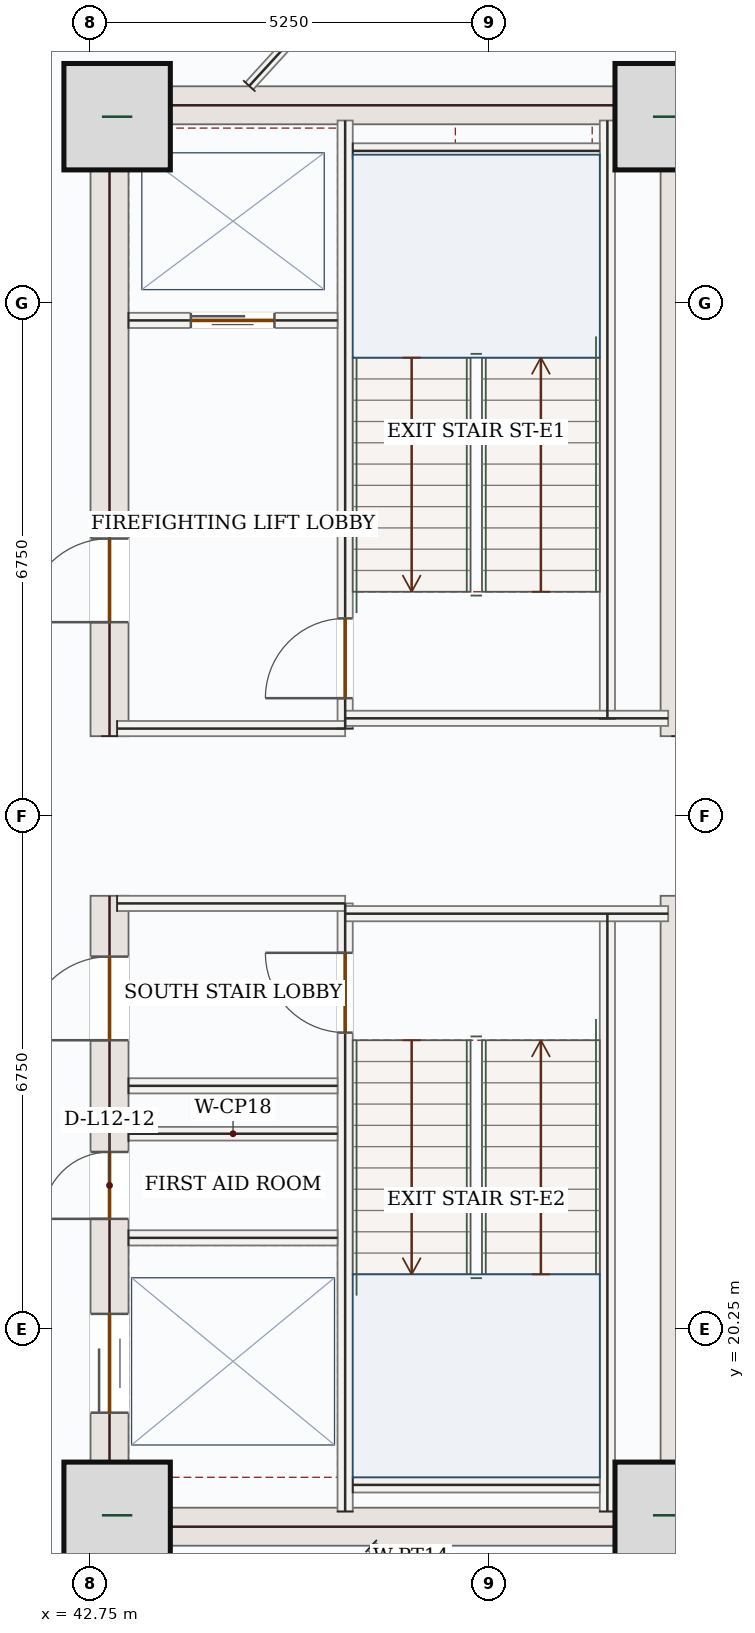
"""IFC4 building model, lengths in metres.
Left out: names, types, materials, properties, quantities, classifications, styles, units other than length and angle.
Written with IfcOpenShell. Run it as: python <this file> out.ifc"""

import sys

from ifc_helpers import new_model, si_unit, direction, frame, frame_2d, origin, origin_2d, place, context, subcontext, project, spatial, rectangle, extrude, source, transform, mapped, element, fill, save


model = new_model("IFC4")
c1 = context("Model", 3, precision=1e-05, world=origin(), true_north=direction((0.0, 1.0)))
c2 = subcontext(c1, "Body", "Model", "MODEL_VIEW")
j1 = project(units=[si_unit("LENGTHUNIT", "METRE"), si_unit("PLANEANGLEUNIT", "RADIAN")], contexts=[c1])
p1 = place(None, origin())
s1 = spatial("IfcSite", under=j1, at=p1, CompositionType="ELEMENT")
p2 = place(p1, origin())
s2 = spatial("IfcBuilding", under=s1, at=p2, CompositionType="ELEMENT")
p3 = place(p2, frame((0.0, 0.0, 58.5)))
s3 = spatial("IfcBuildingStorey", under=s2, at=p3, CompositionType="ELEMENT", Elevation=58.5)
p4 = place(p3, frame((43.0, 17.4, 0.0), z_axis=(0.0, 0.0, 1.0), x_axis=(0.0, 1.0, 0.0)))
e1 = element("IfcWall", 1, at=p4, inside=s3, PredefinedType="SHEAR", context=c2, shape_type="SweptSolid", body=[
    extrude(rectangle(XDim=8.55, YDim=0.5, at=frame_2d((4.275, 0.0))), origin(), (0.0, 0.0, 1.0), 3.95),
])
p5 = place(p4, frame((6.65, 0.0, 0.0)))
e2 = element("IfcOpeningElement", 2, at=p5, cuts=e1, PredefinedType="OPENING", context=c2, shape_type="SweptSolid", body=[
    extrude(rectangle(XDim=1.1, YDim=2.2, at=frame_2d((0.55, 1.1))), frame((0.0, 0.26, 0.0), z_axis=(0.0, -1.0, 0.0), x_axis=(1.0, 0.0, 0.0)), (0.0, 0.0, 1.0), 0.52),
])
p6 = place(p4, frame((1.75, 0.0, 0.0)))
e3 = element("IfcOpeningElement", 3, at=p6, cuts=e1, PredefinedType="OPENING", context=c2, shape_type="SweptSolid", body=[
    extrude(rectangle(XDim=1.3, YDim=2.2, at=frame_2d((0.65, 1.1))), frame((0.0, 0.26, 0.0), z_axis=(0.0, -1.0, 0.0), x_axis=(1.0, 0.0, 0.0)), (0.0, 0.0, 1.0), 0.52),
])
p7 = place(p4, frame((4.3, 0.0, 0.0)))
e4 = element("IfcOpeningElement", 4, at=p7, cuts=e1, PredefinedType="OPENING", context=c2, shape_type="SweptSolid", body=[
    extrude(rectangle(XDim=0.88, YDim=2.1, at=frame_2d((0.44, 1.05))), frame((0.0, 0.26, 0.0), z_axis=(0.0, -1.0, 0.0), x_axis=(1.0, 0.0, 0.0)), (0.0, 0.0, 1.0), 0.52),
])
p8 = place(p3, frame((43.0, 28.05, 0.0), z_axis=(0.0, 0.0, 1.0), x_axis=(0.0, 1.0, 0.0)))
e5 = element("IfcWall", 5, at=p8, inside=s3, PredefinedType="SHEAR", context=c2, shape_type="SweptSolid", body=[
    extrude(rectangle(XDim=8.55, YDim=0.5, at=frame_2d((4.275, 0.0))), origin(), (0.0, 0.0, 1.0), 3.95),
])
p9 = place(p8, frame((1.5, 0.0, 0.0)))
e6 = element("IfcOpeningElement", 6, at=p9, cuts=e5, PredefinedType="OPENING", context=c2, shape_type="SweptSolid", body=[
    extrude(rectangle(XDim=1.1, YDim=2.2, at=frame_2d((0.55, 1.1))), frame((0.0, 0.26, 0.0), z_axis=(0.0, -1.0, 0.0), x_axis=(1.0, 0.0, 0.0)), (0.0, 0.0, 1.0), 0.52),
])
m1 = source(origin(), c2, "Body", "SweptSolid", [
    extrude(rectangle(XDim=8.55, YDim=0.5, at=frame_2d((4.275, 0.0))), origin(), (0.0, 0.0, 1.0), 3.95),
])
for number, where, z_axis, x_axis in (
    (7, (50.5, 17.4, 0.0), (0.0, 0.0, 1.0), (0.0, 1.0, 0.0)),
    (8, (50.5, 28.05, 0.0), (0.0, 0.0, 1.0), (0.0, 1.0, 0.0)),
):
    element("IfcWall", number, at=place(p3, frame(where, z_axis=z_axis, x_axis=x_axis)), inside=s3, PredefinedType="SHEAR", context=c2, shape_type="MappedRepresentation", body=[
        mapped(m1, transform((0.0, 0.0, 0.0), x_axis=(1.0, 0.0, 0.0), y_axis=(0.0, 1.0, 0.0), z_axis=(0.0, 0.0, 1.0), scale=1.0)),
    ])
m2 = source(origin(), c2, "Body", "SweptSolid", [
    extrude(rectangle(XDim=7.0, YDim=0.5, at=frame_2d((3.5, 0.0))), origin(), (0.0, 0.0, 1.0), 3.95),
])
for number, where, z_axis, x_axis in (
    (9, (43.25, 17.65, 0.0), (0.0, 0.0, 1.0), (1.0, 0.0, 0.0)),
    (10, (43.25, 36.35, 0.0), (0.0, 0.0, 1.0), (1.0, 0.0, 0.0)),
):
    element("IfcWall", number, at=place(p3, frame(where, z_axis=z_axis, x_axis=x_axis)), inside=s3, PredefinedType="SHEAR", context=c2, shape_type="MappedRepresentation", body=[
        mapped(m2, transform((0.0, 0.0, 0.0), x_axis=(1.0, 0.0, 0.0), y_axis=(0.0, 1.0, 0.0), z_axis=(0.0, 0.0, 1.0), scale=1.0)),
    ])
m3 = source(origin(), c2, "Body", "SweptSolid", [
    extrude(rectangle(XDim=1.4, YDim=1.4, at=origin_2d()), origin(), (0.0, 0.0, 1.0), 4.2),
])
for number, where, z_axis, x_axis in (
    (11, (43.1, 17.8, 0.0), (0.0, 0.0, 1.0), (1.0, 0.0, 0.0)),
    (12, (50.35, 17.8, 0.0), (0.0, 0.0, 1.0), (1.0, 0.0, 0.0)),
    (13, (43.1, 36.2, 0.0), (0.0, 0.0, 1.0), (1.0, 0.0, 0.0)),
    (14, (50.35, 36.2, 0.0), (0.0, 0.0, 1.0), (1.0, 0.0, 0.0)),
):
    element("IfcColumn", number, at=place(p3, frame(where, z_axis=z_axis, x_axis=x_axis)), inside=s3, PredefinedType="COLUMN", context=c2, shape_type="MappedRepresentation", body=[
        mapped(m3, transform((0.0, 0.0, 0.0), x_axis=(1.0, 0.0, 0.0), y_axis=(0.0, 1.0, 0.0), z_axis=(0.0, 0.0, 1.0), scale=1.0)),
    ])
p10 = place(p3, frame((53.06, 18.458, 0.0), z_axis=(0.0, 0.0, 1.0), x_axis=(-0.707106781187, -0.707106781187, 0.0)))
e15 = element("IfcWall", 15, at=p10, inside=s3, PredefinedType="SOLIDWALL", context=c2, shape_type="SweptSolid", body=[
    extrude(rectangle(XDim=5.258, YDim=0.32, at=frame_2d((2.629, 0.0))), origin(), (0.0, 0.0, 1.0), 3.95),
])
p11 = place(p10, frame((1.429, 0.0, 0.85)))
e16 = element("IfcOpeningElement", 16, at=p11, cuts=e15, PredefinedType="OPENING", context=c2, shape_type="SweptSolid", body=[
    extrude(rectangle(XDim=2.4, YDim=1.8, at=frame_2d((1.2, 0.9))), frame((0.0, 0.17, 0.0), z_axis=(0.0, -1.0, 0.0), x_axis=(1.0, 0.0, 0.0)), (0.0, 0.0, 1.0), 0.34),
])
m4 = source(origin(), c2, "Body", "SweptSolid", [
    extrude(rectangle(XDim=5.258, YDim=0.32, at=frame_2d((2.629, 0.0))), origin(), (0.0, 0.0, 1.0), 3.95),
])
p12 = place(p3, frame((49.342, 39.26, 0.0), z_axis=(0.0, 0.0, 1.0), x_axis=(0.707106781187, -0.707106781187, 0.0)))
e17 = element("IfcWall", 17, at=p12, inside=s3, PredefinedType="SOLIDWALL", context=c2, shape_type="MappedRepresentation", body=[
    mapped(m4, transform((0.0, 0.0, 0.0), x_axis=(1.0, 0.0, 0.0), y_axis=(0.0, 1.0, 0.0), z_axis=(0.0, 0.0, 1.0), scale=1.0)),
])
m5 = source(origin(), c2, "Body", "SweptSolid", [
    extrude(rectangle(XDim=7.87, YDim=0.2, at=frame_2d((3.935, 0.0))), origin(), (0.0, 0.0, 1.0), 3.95),
])
for number, where, z_axis, x_axis in (
    (18, (49.55, 17.85, 0.0), (0.0, 0.0, 1.0), (0.0, 1.0, 0.0)),
    (19, (49.55, 28.28, 0.0), (0.0, 0.0, 1.0), (0.0, 1.0, 0.0)),
):
    element("IfcWall", number, at=place(p3, frame(where, z_axis=z_axis, x_axis=x_axis)), inside=s3, PredefinedType="SOLIDWALL", context=c2, shape_type="MappedRepresentation", body=[
        mapped(m5, transform((0.0, 0.0, 0.0), x_axis=(1.0, 0.0, 0.0), y_axis=(0.0, 1.0, 0.0), z_axis=(0.0, 0.0, 1.0), scale=1.0)),
    ])
p13 = place(p3, frame((46.1, 17.85, 0.0), z_axis=(0.0, 0.0, 1.0), x_axis=(0.0, 1.0, 0.0)))
e20 = element("IfcWall", 20, at=p13, inside=s3, PredefinedType="SOLIDWALL", context=c2, shape_type="SweptSolid", body=[
    extrude(rectangle(XDim=8.0, YDim=0.2, at=frame_2d((4.0, 0.0))), origin(), (0.0, 0.0, 1.0), 3.95),
])
p14 = place(p13, frame((6.3, 0.0, 0.0)))
e21 = element("IfcOpeningElement", 21, at=p14, cuts=e20, PredefinedType="OPENING", context=c2, shape_type="SweptSolid", body=[
    extrude(rectangle(XDim=1.05, YDim=2.15, at=frame_2d((0.525, 1.075))), frame((0.0, 0.11, 0.0), z_axis=(0.0, -1.0, 0.0), x_axis=(1.0, 0.0, 0.0)), (0.0, 0.0, 1.0), 0.22),
])
p15 = place(p3, frame((46.1, 28.15, 0.0), z_axis=(0.0, 0.0, 1.0), x_axis=(0.0, 1.0, 0.0)))
e22 = element("IfcWall", 22, at=p15, inside=s3, PredefinedType="SOLIDWALL", context=c2, shape_type="SweptSolid", body=[
    extrude(rectangle(XDim=8.0, YDim=0.2, at=frame_2d((4.0, 0.0))), origin(), (0.0, 0.0, 1.0), 3.95),
])
p16 = place(p15, frame((0.4, 0.0, 0.0)))
e23 = element("IfcOpeningElement", 23, at=p16, cuts=e22, PredefinedType="OPENING", context=c2, shape_type="SweptSolid", body=[
    extrude(rectangle(XDim=1.05, YDim=2.15, at=frame_2d((0.525, 1.075))), frame((0.0, 0.11, 0.0), z_axis=(0.0, -1.0, 0.0), x_axis=(1.0, 0.0, 0.0)), (0.0, 0.0, 1.0), 0.22),
])
m6 = source(origin(), c2, "Body", "SweptSolid", [
    extrude(rectangle(XDim=3.0, YDim=0.2, at=frame_2d((1.5, 0.0))), origin(), (0.0, 0.0, 1.0), 3.95),
])
p17 = place(p3, frame((43.1, 25.85, 0.0), z_axis=(0.0, 0.0, 1.0), x_axis=(1.0, 0.0, 0.0)))
e24 = element("IfcWall", 24, at=p17, inside=s3, PredefinedType="SOLIDWALL", context=c2, shape_type="MappedRepresentation", body=[
    mapped(m6, transform((0.0, 0.0, 0.0), x_axis=(1.0, 0.0, 0.0), y_axis=(0.0, 1.0, 0.0), z_axis=(0.0, 0.0, 1.0), scale=1.0)),
])
m7 = source(origin(), c2, "Body", "SweptSolid", [
    extrude(rectangle(XDim=4.25, YDim=0.2, at=frame_2d((2.125, 0.0))), origin(), (0.0, 0.0, 1.0), 3.95),
])
p18 = place(p3, frame((46.1, 25.715, 0.0), z_axis=(0.0, 0.0, 1.0), x_axis=(1.0, 0.0, 0.0)))
e25 = element("IfcWall", 25, at=p18, inside=s3, PredefinedType="SOLIDWALL", context=c2, shape_type="MappedRepresentation", body=[
    mapped(m7, transform((0.0, 0.0, 0.0), x_axis=(1.0, 0.0, 0.0), y_axis=(0.0, 1.0, 0.0), z_axis=(0.0, 0.0, 1.0), scale=1.0)),
])
p19 = place(p3, frame((43.1, 28.15, 0.0), z_axis=(0.0, 0.0, 1.0), x_axis=(1.0, 0.0, 0.0)))
e26 = element("IfcWall", 26, at=p19, inside=s3, PredefinedType="SOLIDWALL", context=c2, shape_type="MappedRepresentation", body=[
    mapped(m6, transform((0.0, 0.0, 0.0), x_axis=(1.0, 0.0, 0.0), y_axis=(0.0, 1.0, 0.0), z_axis=(0.0, 0.0, 1.0), scale=1.0)),
])
p20 = place(p3, frame((46.1, 28.285, 0.0), z_axis=(0.0, 0.0, 1.0), x_axis=(1.0, 0.0, 0.0)))
e27 = element("IfcWall", 27, at=p20, inside=s3, PredefinedType="SOLIDWALL", context=c2, shape_type="MappedRepresentation", body=[
    mapped(m7, transform((0.0, 0.0, 0.0), x_axis=(1.0, 0.0, 0.0), y_axis=(0.0, 1.0, 0.0), z_axis=(0.0, 0.0, 1.0), scale=1.0)),
])
m8 = source(origin(), c2, "Body", "SweptSolid", [
    extrude(rectangle(XDim=3.25, YDim=0.2, at=frame_2d((1.625, 0.0))), origin(), (0.0, 0.0, 1.0), 3.95),
])
for number, where, z_axis, x_axis in (
    (28, (46.2, 35.75, 0.0), (0.0, 0.0, 1.0), (1.0, 0.0, 0.0)),
    (29, (46.2, 18.2, 0.0), (0.0, 0.0, 1.0), (1.0, 0.0, 0.0)),
):
    element("IfcWall", number, at=place(p3, frame(where, z_axis=z_axis, x_axis=x_axis)), inside=s3, PredefinedType="SOLIDWALL", context=c2, shape_type="MappedRepresentation", body=[
        mapped(m8, transform((0.0, 0.0, 0.0), x_axis=(1.0, 0.0, 0.0), y_axis=(0.0, 1.0, 0.0), z_axis=(0.0, 0.0, 1.0), scale=1.0)),
    ])
p21 = place(p3, frame((43.25, 33.52, 0.0), z_axis=(0.0, 0.0, 1.0), x_axis=(1.0, 0.0, 0.0)))
e30 = element("IfcWall", 30, at=p21, inside=s3, PredefinedType="SOLIDWALL", context=c2, shape_type="SweptSolid", body=[
    extrude(rectangle(XDim=2.75, YDim=0.2, at=frame_2d((1.375, 0.0))), origin(), (0.0, 0.0, 1.0), 3.95),
])
p22 = place(p21, frame((0.82, 0.0, 0.0)))
e31 = element("IfcOpeningElement", 31, at=p22, cuts=e30, PredefinedType="OPENING", context=c2, shape_type="SweptSolid", body=[
    extrude(rectangle(XDim=1.1, YDim=2.15, at=frame_2d((0.55, 1.075))), frame((0.0, 0.11, 0.0), z_axis=(0.0, -1.0, 0.0), x_axis=(1.0, 0.0, 0.0)), (0.0, 0.0, 1.0), 0.22),
])
m9 = source(origin(), c2, "Body", "SweptSolid", [
    extrude(rectangle(XDim=2.75, YDim=0.2, at=frame_2d((1.375, 0.0))), origin(), (0.0, 0.0, 1.0), 3.95),
])
for number, where, z_axis, x_axis in (
    (32, (43.25, 23.45, 0.0), (0.0, 0.0, 1.0), (1.0, 0.0, 0.0)),
    (33, (43.25, 21.45, 0.0), (0.0, 0.0, 1.0), (1.0, 0.0, 0.0)),
):
    element("IfcWall", number, at=place(p3, frame(where, z_axis=z_axis, x_axis=x_axis)), inside=s3, PredefinedType="SOLIDWALL", context=c2, shape_type="MappedRepresentation", body=[
        mapped(m9, transform((0.0, 0.0, 0.0), x_axis=(1.0, 0.0, 0.0), y_axis=(0.0, 1.0, 0.0), z_axis=(0.0, 0.0, 1.0), scale=1.0)),
    ])
m10 = source(origin(), c2, "Body", "SweptSolid", [
    extrude(rectangle(XDim=2.75, YDim=0.18, at=frame_2d((1.375, 0.0))), origin(), (0.0, 0.0, 1.0), 3.95),
])
p23 = place(p3, frame((43.25, 22.82, 0.0), z_axis=(0.0, 0.0, 1.0), x_axis=(1.0, 0.0, 0.0)))
e34 = element("IfcWall", 34, at=p23, inside=s3, PredefinedType="PARTITIONING", context=c2, shape_type="MappedRepresentation", body=[
    mapped(m10, transform((0.0, 0.0, 0.0), x_axis=(1.0, 0.0, 0.0), y_axis=(0.0, 1.0, 0.0), z_axis=(0.0, 0.0, 1.0), scale=1.0)),
])
m11 = source(origin(), c2, "Body", "SweptSolid", [
    extrude(rectangle(XDim=1.417, YDim=0.14, at=frame_2d((0.708, 0.0))), origin(), (0.0, 0.0, 1.0), 3.95),
])
p24 = place(p3, frame((46.443, 17.395, 0.0), z_axis=(0.0, 0.0, 1.0), x_axis=(0.737776192982, -0.675045397784, 0.0)))
e35 = element("IfcWall", 35, at=p24, inside=s3, PredefinedType="PARTITIONING", context=c2, shape_type="MappedRepresentation", body=[
    mapped(m11, transform((0.0, 0.0, 0.0), x_axis=(1.0, 0.0, 0.0), y_axis=(0.0, 1.0, 0.0), z_axis=(0.0, 0.0, 1.0), scale=1.0)),
])
m12 = source(origin(), c2, "Body", "SweptSolid", [
    extrude(rectangle(XDim=3.375, YDim=0.14, at=frame_2d((1.688, 0.0))), origin(), (0.0, 0.0, 1.0), 3.95),
])
p25 = place(p3, frame((44.838, 36.605, 0.0), z_axis=(0.0, 0.0, 1.0), x_axis=(0.674974079893, 0.737841440604, 0.0)))
e36 = element("IfcWall", 36, at=p25, inside=s3, PredefinedType="PARTITIONING", context=c2, shape_type="MappedRepresentation", body=[
    mapped(m12, transform((0.0, 0.0, 0.0), x_axis=(1.0, 0.0, 0.0), y_axis=(0.0, 1.0, 0.0), z_axis=(0.0, 0.0, 1.0), scale=1.0)),
])
m13 = source(origin(), c2, "Body", "SweptSolid", [
    extrude(rectangle(XDim=2.4, YDim=1.8, at=frame_2d((1.2, 0.9))), frame((0.0, 0.03, 0.0), z_axis=(0.0, -1.0, 0.0), x_axis=(1.0, 0.0, 0.0)), (0.0, 0.0, 1.0), 0.06),
])
p26 = place(p11, origin())
e37 = element("IfcWindow", 37, at=p26, inside=s3, PartitioningType="DOUBLE_PANEL_VERTICAL", PredefinedType="WINDOW", context=c2, shape_type="MappedRepresentation", body=[
    mapped(m13, transform((0.0, 0.0, 0.0), x_axis=(1.0, 0.0, 0.0), y_axis=(0.0, 1.0, 0.0), z_axis=(0.0, 0.0, 1.0), scale=1.0)),
])
fill(e16, e37)
m14 = source(origin(), c2, "Body", "SweptSolid", [
    extrude(rectangle(XDim=1.05, YDim=2.15, at=frame_2d((0.525, 1.075))), frame((0.0, 0.025, 0.0), z_axis=(0.0, -1.0, 0.0), x_axis=(1.0, 0.0, 0.0)), (0.0, 0.0, 1.0), 0.05),
])
p27 = place(p16, origin())
e38 = element("IfcDoor", 38, at=p27, inside=s3, OperationType="SINGLE_SWING_LEFT", PredefinedType="DOOR", context=c2, shape_type="MappedRepresentation", body=[
    mapped(m14, transform((0.0, 0.0, 0.0), x_axis=(1.0, 0.0, 0.0), y_axis=(0.0, 1.0, 0.0), z_axis=(0.0, 0.0, 1.0), scale=1.0)),
])
fill(e23, e38)
p28 = place(p14, origin())
e39 = element("IfcDoor", 39, at=p28, inside=s3, OperationType="SINGLE_SWING_RIGHT", PredefinedType="DOOR", context=c2, shape_type="MappedRepresentation", body=[
    mapped(m14, transform((0.0, 0.0, 0.0), x_axis=(1.0, 0.0, 0.0), y_axis=(0.0, 1.0, 0.0), z_axis=(0.0, 0.0, 1.0), scale=1.0)),
])
fill(e21, e39)
m15 = source(origin(), c2, "Body", "SweptSolid", [
    extrude(rectangle(XDim=1.1, YDim=2.15, at=frame_2d((0.55, 1.075))), frame((0.0, 0.025, 0.0), z_axis=(0.0, -1.0, 0.0), x_axis=(1.0, 0.0, 0.0)), (0.0, 0.0, 1.0), 0.05),
])
p29 = place(p22, origin())
e40 = element("IfcDoor", 40, at=p29, inside=s3, OperationType="DOUBLE_DOOR_SLIDING", PredefinedType="DOOR", context=c2, shape_type="MappedRepresentation", body=[
    mapped(m15, transform((0.0, 0.0, 0.0), x_axis=(1.0, 0.0, 0.0), y_axis=(0.0, 1.0, 0.0), z_axis=(0.0, 0.0, 1.0), scale=1.0)),
])
fill(e31, e40)
m16 = source(origin(), c2, "Body", "SweptSolid", [
    extrude(rectangle(XDim=1.1, YDim=2.2, at=frame_2d((0.55, 1.1))), frame((0.0, 0.025, 0.0), z_axis=(0.0, -1.0, 0.0), x_axis=(1.0, 0.0, 0.0)), (0.0, 0.0, 1.0), 0.05),
])
p30 = place(p9, origin())
e41 = element("IfcDoor", 41, at=p30, inside=s3, OperationType="SINGLE_SWING_LEFT", PredefinedType="DOOR", context=c2, shape_type="MappedRepresentation", body=[
    mapped(m16, transform((0.0, 0.0, 0.0), x_axis=(1.0, 0.0, 0.0), y_axis=(0.0, 1.0, 0.0), z_axis=(0.0, 0.0, 1.0), scale=1.0)),
])
fill(e6, e41)
p31 = place(p5, origin())
e42 = element("IfcDoor", 42, at=p31, inside=s3, OperationType="SINGLE_SWING_LEFT", PredefinedType="DOOR", context=c2, shape_type="MappedRepresentation", body=[
    mapped(m16, transform((0.0, 0.0, 0.0), x_axis=(1.0, 0.0, 0.0), y_axis=(0.0, 1.0, 0.0), z_axis=(0.0, 0.0, 1.0), scale=1.0)),
])
fill(e2, e42)
m17 = source(origin(), c2, "Body", "SweptSolid", [
    extrude(rectangle(XDim=1.3, YDim=2.2, at=frame_2d((0.65, 1.1))), frame((0.0, 0.025, 0.0), z_axis=(0.0, -1.0, 0.0), x_axis=(1.0, 0.0, 0.0)), (0.0, 0.0, 1.0), 0.05),
])
p32 = place(p6, origin())
e43 = element("IfcDoor", 43, at=p32, inside=s3, OperationType="DOUBLE_DOOR_SLIDING", PredefinedType="DOOR", context=c2, shape_type="MappedRepresentation", body=[
    mapped(m17, transform((0.0, 0.0, 0.0), x_axis=(1.0, 0.0, 0.0), y_axis=(0.0, 1.0, 0.0), z_axis=(0.0, 0.0, 1.0), scale=1.0)),
])
fill(e3, e43)
m18 = source(origin(), c2, "Body", "SweptSolid", [
    extrude(rectangle(XDim=0.88, YDim=2.1, at=frame_2d((0.44, 1.05))), frame((0.0, 0.025, 0.0), z_axis=(0.0, -1.0, 0.0), x_axis=(1.0, 0.0, 0.0)), (0.0, 0.0, 1.0), 0.05),
])
p33 = place(p7, origin())
e44 = element("IfcDoor", 44, at=p33, inside=s3, OperationType="SINGLE_SWING_LEFT", PredefinedType="DOOR", context=c2, shape_type="MappedRepresentation", body=[
    mapped(m18, transform((0.0, 0.0, 0.0), x_axis=(1.0, 0.0, 0.0), y_axis=(0.0, 1.0, 0.0), z_axis=(0.0, 0.0, 1.0), scale=1.0)),
])
fill(e4, e44)
save(model, sys.argv[1])
